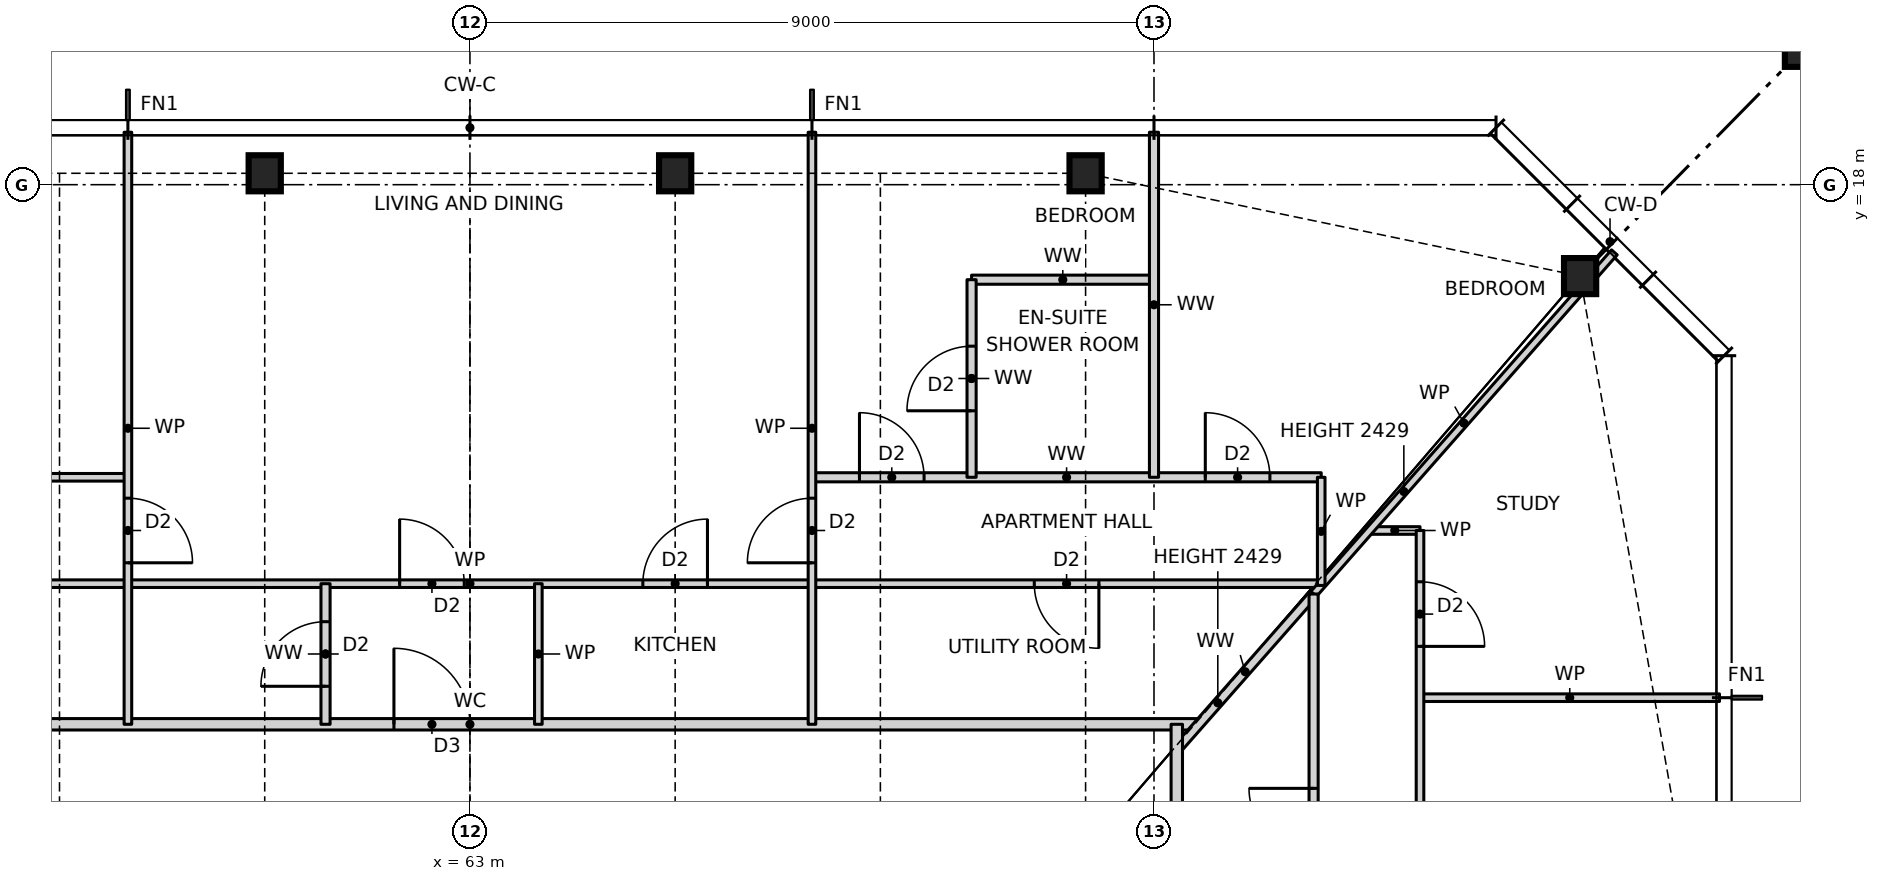
"""IFC4 building model, lengths in metres.
Left out: names, types, materials, properties, quantities, classifications, styles, units other than length and angle.
Written with IfcOpenShell. Run it as: python <this file> out.ifc"""

import sys

from ifc_helpers import new_model, si_unit, direction, frame, frame_2d, origin, origin_2d, place, context, subcontext, project, spatial, rectangle, hollow_rectangle, i_section, extrude, element, fill, save


model = new_model("IFC4")
c1 = context("Model", 3, precision=1e-05, world=origin(), true_north=direction((0.0, 1.0)))
c2 = subcontext(c1, "Body", "Model", "MODEL_VIEW")
j1 = project(units=[si_unit("LENGTHUNIT", "METRE"), si_unit("PLANEANGLEUNIT", "RADIAN")], contexts=[c1])
p1 = place(None, origin())
s1 = spatial("IfcSite", under=j1, at=p1, CompositionType="ELEMENT")
p2 = place(p1, origin())
s2 = spatial("IfcBuilding", under=s1, at=p2, CompositionType="ELEMENT")
p3 = place(p2, frame((0.0, 0.0, 39.5)))
s3 = spatial("IfcBuildingStorey", under=s2, at=p3, CompositionType="ELEMENT", Elevation=39.5)
for number, where, z_axis, x_axis in (
    (1, (77.606, 16.797, 0.0), (0.0, 0.0, 1.0), (1.0, 0.0, 0.0)),
    (2, (71.1, 18.15, 0.0), (0.0, 0.0, 1.0), (1.0, 0.0, 0.0)),
    (3, (65.7, 18.15, 0.0), (0.0, 0.0, 1.0), (1.0, 0.0, 0.0)),
    (4, (60.3, 18.15, 0.0), (0.0, 0.0, 1.0), (1.0, 0.0, 0.0)),
):
    element("IfcColumn", number, at=place(p3, frame(where, z_axis=z_axis, x_axis=x_axis)), inside=s3, PredefinedType="COLUMN", context=c2, shape_type="SweptSolid", body=[
        extrude(i_section(OverallWidth=0.424, OverallDepth=0.475, WebThickness=0.048, FlangeThickness=0.077, at=origin_2d()), origin(), (0.0, 0.0, 1.0), 3.5),
    ])
p4 = place(p3, frame((80.9, 20.15, 0.0), z_axis=(0.0, 0.0, 1.0), x_axis=(1.0, 0.0, 0.0)))
e5 = element("IfcColumn", 5, at=p4, inside=s3, PredefinedType="COLUMN", context=c2, shape_type="SweptSolid", body=[
    extrude(hollow_rectangle(XDim=1.2, YDim=1.2, WallThickness=0.07, at=origin_2d()), origin(), (0.0, 0.0, 1.0), 3.5),
])
p5 = place(p3, frame((53.408, 10.9, 0.0), z_axis=(0.0, 0.0, 1.0), x_axis=(1.0, 0.0, 0.0)))
e6 = element("IfcWall", 6, at=p5, inside=s3, PredefinedType="PARTITIONING", context=c2, shape_type="SweptSolid", body=[
    extrude(rectangle(XDim=19.184, YDim=0.15, at=frame_2d((9.592, 0.0))), origin(), (0.0, 0.0, 1.0), 3.27),
])
p6 = place(p5, frame((8.592, 0.0, 0.0)))
e7 = element("IfcOpeningElement", 7, at=p6, cuts=e6, PredefinedType="OPENING", context=c2, shape_type="SweptSolid", body=[
    extrude(rectangle(XDim=1.0, YDim=2.1, at=frame_2d((0.5, 1.05))), frame((0.0, 0.085, 0.0), z_axis=(0.0, -1.0, 0.0), x_axis=(1.0, 0.0, 0.0)), (0.0, 0.0, 1.0), 0.17),
])
p7 = place(p3, frame((75.5, 11.25, 0.0), z_axis=(0.0, 0.0, 1.0), x_axis=(1.0, 0.0, 0.0)))
e8 = element("IfcWall", 8, at=p7, inside=s3, PredefinedType="PARTITIONING", context=c2, shape_type="SweptSolid", body=[
    extrude(rectangle(XDim=3.94, YDim=0.1, at=frame_2d((1.97, 0.0))), origin(), (0.0, 0.0, 1.0), 3.27),
])
p8 = place(p3, frame((51.8, 12.75, 0.0), z_axis=(0.0, 0.0, 1.0), x_axis=(1.0, 0.0, 0.0)))
e9 = element("IfcWall", 9, at=p8, inside=s3, PredefinedType="PARTITIONING", context=c2, shape_type="SweptSolid", body=[
    extrude(rectangle(XDim=22.4, YDim=0.1, at=frame_2d((11.2, 0.0))), origin(), (0.0, 0.0, 1.0), 3.27),
])
p9 = place(p8, frame((13.475, 0.0, 0.0)))
e10 = element("IfcOpeningElement", 10, at=p9, cuts=e9, PredefinedType="OPENING", context=c2, shape_type="SweptSolid", body=[
    extrude(rectangle(XDim=0.85, YDim=2.1, at=frame_2d((0.425, 1.05))), frame((0.0, 0.06, 0.0), z_axis=(0.0, -1.0, 0.0), x_axis=(1.0, 0.0, 0.0)), (0.0, 0.0, 1.0), 0.12),
])
p10 = place(p8, frame((10.275, 0.0, 0.0)))
e11 = element("IfcOpeningElement", 11, at=p10, cuts=e9, PredefinedType="OPENING", context=c2, shape_type="SweptSolid", body=[
    extrude(rectangle(XDim=0.85, YDim=2.1, at=frame_2d((0.425, 1.05))), frame((0.0, 0.06, 0.0), z_axis=(0.0, -1.0, 0.0), x_axis=(1.0, 0.0, 0.0)), (0.0, 0.0, 1.0), 0.12),
])
p11 = place(p8, frame((18.625, 0.0, 0.0)))
e12 = element("IfcOpeningElement", 12, at=p11, cuts=e9, PredefinedType="OPENING", context=c2, shape_type="SweptSolid", body=[
    extrude(rectangle(XDim=0.85, YDim=2.1, at=frame_2d((0.425, 1.05))), frame((0.0, 0.06, 0.0), z_axis=(0.0, -1.0, 0.0), x_axis=(1.0, 0.0, 0.0)), (0.0, 0.0, 1.0), 0.12),
])
p12 = place(p8, frame((2.925, 0.0, 0.0)))
e13 = element("IfcOpeningElement", 13, at=p12, cuts=e9, PredefinedType="OPENING", context=c2, shape_type="SweptSolid", body=[
    extrude(rectangle(XDim=0.85, YDim=2.1, at=frame_2d((0.425, 1.05))), frame((0.0, 0.06, 0.0), z_axis=(0.0, -1.0, 0.0), x_axis=(1.0, 0.0, 0.0)), (0.0, 0.0, 1.0), 0.12),
])
p13 = place(p3, frame((74.836, 13.45, 0.0), z_axis=(0.0, 0.0, 1.0), x_axis=(1.0, 0.0, 0.0)))
e14 = element("IfcWall", 14, at=p13, inside=s3, PredefinedType="PARTITIONING", context=c2, shape_type="SweptSolid", body=[
    extrude(rectangle(XDim=0.664, YDim=0.1, at=frame_2d((0.332, 0.0))), origin(), (0.0, 0.0, 1.0), 3.27),
])
p14 = place(p3, frame((51.8, 14.15, 0.0), z_axis=(0.0, 0.0, 1.0), x_axis=(1.0, 0.0, 0.0)))
e15 = element("IfcWall", 15, at=p14, inside=s3, PredefinedType="PARTITIONING", context=c2, shape_type="SweptSolid", body=[
    extrude(rectangle(XDim=6.7, YDim=0.1, at=frame_2d((3.35, 0.0))), origin(), (0.0, 0.0, 1.0), 3.27),
])
p15 = place(p14, frame((4.025, 0.0, 0.0)))
e16 = element("IfcOpeningElement", 16, at=p15, cuts=e15, PredefinedType="OPENING", context=c2, shape_type="SweptSolid", body=[
    extrude(rectangle(XDim=0.85, YDim=2.1, at=frame_2d((0.425, 1.05))), frame((0.0, 0.06, 0.0), z_axis=(0.0, -1.0, 0.0), x_axis=(1.0, 0.0, 0.0)), (0.0, 0.0, 1.0), 0.12),
])
p16 = place(p14, frame((0.675, 0.0, 0.0)))
e17 = element("IfcOpeningElement", 17, at=p16, cuts=e15, PredefinedType="OPENING", context=c2, shape_type="SweptSolid", body=[
    extrude(rectangle(XDim=0.85, YDim=2.1, at=frame_2d((0.425, 1.05))), frame((0.0, 0.06, 0.0), z_axis=(0.0, -1.0, 0.0), x_axis=(1.0, 0.0, 0.0)), (0.0, 0.0, 1.0), 0.12),
])
p17 = place(p3, frame((67.5, 14.15, 0.0), z_axis=(0.0, 0.0, 1.0), x_axis=(1.0, 0.0, 0.0)))
e18 = element("IfcWall", 18, at=p17, inside=s3, PredefinedType="PARTITIONING", context=c2, shape_type="SweptSolid", body=[
    extrude(rectangle(XDim=6.7, YDim=0.12, at=frame_2d((3.35, 0.0))), origin(), (0.0, 0.0, 1.0), 3.27),
])
p18 = place(p17, frame((0.625, 0.0, 0.0)))
e19 = element("IfcOpeningElement", 19, at=p18, cuts=e18, PredefinedType="OPENING", context=c2, shape_type="SweptSolid", body=[
    extrude(rectangle(XDim=0.85, YDim=2.1, at=frame_2d((0.425, 1.05))), frame((0.0, 0.07, 0.0), z_axis=(0.0, -1.0, 0.0), x_axis=(1.0, 0.0, 0.0)), (0.0, 0.0, 1.0), 0.14),
])
p19 = place(p17, frame((5.175, 0.0, 0.0)))
e20 = element("IfcOpeningElement", 20, at=p19, cuts=e18, PredefinedType="OPENING", context=c2, shape_type="SweptSolid", body=[
    extrude(rectangle(XDim=0.85, YDim=2.1, at=frame_2d((0.425, 1.05))), frame((0.0, 0.07, 0.0), z_axis=(0.0, -1.0, 0.0), x_axis=(1.0, 0.0, 0.0)), (0.0, 0.0, 1.0), 0.14),
])
p20 = place(p3, frame((69.6, 16.75, 0.0), z_axis=(0.0, 0.0, 1.0), x_axis=(1.0, 0.0, 0.0)))
e21 = element("IfcWall", 21, at=p20, inside=s3, PredefinedType="PARTITIONING", context=c2, shape_type="SweptSolid", body=[
    extrude(rectangle(XDim=2.4, YDim=0.12, at=frame_2d((1.2, 0.0))), origin(), (0.0, 0.0, 1.0), 3.27),
])
p21 = place(p3, frame((74.1, 12.614, 0.0), z_axis=(0.0, 0.0, 1.0), x_axis=(0.660755619739, 0.750601099775, 0.0)))
e22 = element("IfcWall", 22, at=p21, inside=s3, PredefinedType="PARTITIONING", context=c2, shape_type="SweptSolid", body=[
    extrude(rectangle(XDim=5.989, YDim=0.1, at=frame_2d((2.995, 0.0))), origin(), (0.0, 0.0, 1.0), 2.429),
])
p22 = place(p3, frame((72.299, 10.569, 0.0), z_axis=(0.0, 0.0, 1.0), x_axis=(0.660797520752, 0.750564212155, 0.0)))
e23 = element("IfcWall", 23, at=p22, inside=s3, PredefinedType="PARTITIONING", context=c2, shape_type="SweptSolid", body=[
    extrude(rectangle(XDim=2.725, YDim=0.12, at=frame_2d((1.363, 0.0))), origin(), (0.0, 0.0, 1.0), 2.429),
])
p23 = place(p3, frame((75.5, 2.25, 0.0), z_axis=(0.0, 0.0, 1.0), x_axis=(0.0, 1.0, 0.0)))
e24 = element("IfcWall", 24, at=p23, inside=s3, PredefinedType="PARTITIONING", context=c2, shape_type="SweptSolid", body=[
    extrude(rectangle(XDim=11.2, YDim=0.1, at=frame_2d((5.6, 0.0))), origin(), (0.0, 0.0, 1.0), 3.27),
])
p24 = place(p23, frame((1.825, 0.0, 0.0)))
e25 = element("IfcOpeningElement", 25, at=p24, cuts=e24, PredefinedType="OPENING", context=c2, shape_type="SweptSolid", body=[
    extrude(rectangle(XDim=0.85, YDim=2.1, at=frame_2d((0.425, 1.05))), frame((0.0, 0.06, 0.0), z_axis=(0.0, -1.0, 0.0), x_axis=(1.0, 0.0, 0.0)), (0.0, 0.0, 1.0), 0.12),
])
p25 = place(p23, frame((6.325, 0.0, 0.0)))
e26 = element("IfcOpeningElement", 26, at=p25, cuts=e24, PredefinedType="OPENING", context=c2, shape_type="SweptSolid", body=[
    extrude(rectangle(XDim=0.85, YDim=2.1, at=frame_2d((0.425, 1.05))), frame((0.0, 0.06, 0.0), z_axis=(0.0, -1.0, 0.0), x_axis=(1.0, 0.0, 0.0)), (0.0, 0.0, 1.0), 0.12),
])
p26 = place(p23, frame((9.675, 0.0, 0.0)))
e27 = element("IfcOpeningElement", 27, at=p26, cuts=e24, PredefinedType="OPENING", context=c2, shape_type="SweptSolid", body=[
    extrude(rectangle(XDim=0.85, YDim=2.1, at=frame_2d((0.425, 1.05))), frame((0.0, 0.06, 0.0), z_axis=(0.0, -1.0, 0.0), x_axis=(1.0, 0.0, 0.0)), (0.0, 0.0, 1.0), 0.12),
])
p27 = place(p3, frame((74.2, 12.727, 0.0), z_axis=(0.0, 0.0, 1.0), x_axis=(0.0, 1.0, 0.0)))
e28 = element("IfcWall", 28, at=p27, inside=s3, PredefinedType="PARTITIONING", context=c2, shape_type="SweptSolid", body=[
    extrude(rectangle(XDim=1.423, YDim=0.1, at=frame_2d((0.711, 0.0))), origin(), (0.0, 0.0, 1.0), 3.27),
])
p28 = place(p3, frame((74.1, -12.614, 0.0), z_axis=(0.0, 0.0, 1.0), x_axis=(0.0, 1.0, 0.0)))
e29 = element("IfcWall", 29, at=p28, inside=s3, PredefinedType="PARTITIONING", context=c2, shape_type="SweptSolid", body=[
    extrude(rectangle(XDim=25.228, YDim=0.12, at=frame_2d((12.614, 0.0))), origin(), (0.0, 0.0, 1.0), 3.27),
])
p29 = place(p28, frame((7.239, 0.0, 0.0)))
e30 = element("IfcOpeningElement", 30, at=p29, cuts=e29, PredefinedType="OPENING", context=c2, shape_type="SweptSolid", body=[
    extrude(rectangle(XDim=0.85, YDim=2.1, at=frame_2d((0.425, 1.05))), frame((0.0, 0.07, 0.0), z_axis=(0.0, -1.0, 0.0), x_axis=(1.0, 0.0, 0.0)), (0.0, 0.0, 1.0), 0.14),
])
p30 = place(p28, frame((10.439, 0.0, 0.0)))
e31 = element("IfcOpeningElement", 31, at=p30, cuts=e29, PredefinedType="OPENING", context=c2, shape_type="SweptSolid", body=[
    extrude(rectangle(XDim=0.85, YDim=2.1, at=frame_2d((0.425, 1.05))), frame((0.0, 0.07, 0.0), z_axis=(0.0, -1.0, 0.0), x_axis=(1.0, 0.0, 0.0)), (0.0, 0.0, 1.0), 0.14),
])
p31 = place(p28, frame((2.507, 0.0, 0.0)))
e32 = element("IfcOpeningElement", 32, at=p31, cuts=e29, PredefinedType="OPENING", context=c2, shape_type="SweptSolid", body=[
    extrude(rectangle(XDim=0.85, YDim=2.1, at=frame_2d((0.425, 1.05))), frame((0.0, 0.07, 0.0), z_axis=(0.0, -1.0, 0.0), x_axis=(1.0, 0.0, 0.0)), (0.0, 0.0, 1.0), 0.14),
])
p32 = place(p28, frame((16.639, 0.0, 0.0)))
e33 = element("IfcOpeningElement", 33, at=p32, cuts=e29, PredefinedType="OPENING", context=c2, shape_type="SweptSolid", body=[
    extrude(rectangle(XDim=0.85, YDim=2.1, at=frame_2d((0.425, 1.05))), frame((0.0, 0.07, 0.0), z_axis=(0.0, -1.0, 0.0), x_axis=(1.0, 0.0, 0.0)), (0.0, 0.0, 1.0), 0.14),
])
p33 = place(p28, frame((21.821, 0.0, 0.0)))
e34 = element("IfcOpeningElement", 34, at=p33, cuts=e29, PredefinedType="OPENING", context=c2, shape_type="SweptSolid", body=[
    extrude(rectangle(XDim=0.85, YDim=2.1, at=frame_2d((0.425, 1.05))), frame((0.0, 0.07, 0.0), z_axis=(0.0, -1.0, 0.0), x_axis=(1.0, 0.0, 0.0)), (0.0, 0.0, 1.0), 0.14),
])
p34 = place(p3, frame((72.3, -10.568, 0.0), z_axis=(0.0, 0.0, 1.0), x_axis=(0.0, 1.0, 0.0)))
e35 = element("IfcWall", 35, at=p34, inside=s3, PredefinedType="PARTITIONING", context=c2, shape_type="SweptSolid", body=[
    extrude(rectangle(XDim=21.468, YDim=0.15, at=frame_2d((10.734, 0.0))), origin(), (0.0, 0.0, 1.0), 3.27),
])
p35 = place(p34, frame((8.318, 0.0, 0.0)))
e36 = element("IfcOpeningElement", 36, at=p35, cuts=e35, PredefinedType="OPENING", context=c2, shape_type="SweptSolid", body=[
    extrude(rectangle(XDim=1.0, YDim=2.1, at=frame_2d((0.5, 1.05))), frame((0.0, 0.085, 0.0), z_axis=(0.0, -1.0, 0.0), x_axis=(1.0, 0.0, 0.0)), (0.0, 0.0, 1.0), 0.17),
])
p36 = place(p3, frame((72.0, 14.15, 0.0), z_axis=(0.0, 0.0, 1.0), x_axis=(0.0, 1.0, 0.0)))
e37 = element("IfcWall", 37, at=p36, inside=s3, PredefinedType="PARTITIONING", context=c2, shape_type="SweptSolid", body=[
    extrude(rectangle(XDim=4.54, YDim=0.12, at=frame_2d((2.27, 0.0))), origin(), (0.0, 0.0, 1.0), 3.27),
])
p37 = place(p3, frame((69.6, 14.15, 0.0), z_axis=(0.0, 0.0, 1.0), x_axis=(0.0, 1.0, 0.0)))
e38 = element("IfcWall", 38, at=p37, inside=s3, PredefinedType="PARTITIONING", context=c2, shape_type="SweptSolid", body=[
    extrude(rectangle(XDim=2.6, YDim=0.12, at=frame_2d((1.3, 0.0))), origin(), (0.0, 0.0, 1.0), 3.27),
])
p38 = place(p37, frame((0.875, 0.0, 0.0)))
e39 = element("IfcOpeningElement", 39, at=p38, cuts=e38, PredefinedType="OPENING", context=c2, shape_type="SweptSolid", body=[
    extrude(rectangle(XDim=0.85, YDim=2.1, at=frame_2d((0.425, 1.05))), frame((0.0, 0.07, 0.0), z_axis=(0.0, -1.0, 0.0), x_axis=(1.0, 0.0, 0.0)), (0.0, 0.0, 1.0), 0.14),
])
p39 = place(p3, frame((67.5, 10.9, 0.0), z_axis=(0.0, 0.0, 1.0), x_axis=(0.0, 1.0, 0.0)))
e40 = element("IfcWall", 40, at=p39, inside=s3, PredefinedType="PARTITIONING", context=c2, shape_type="SweptSolid", body=[
    extrude(rectangle(XDim=7.79, YDim=0.1, at=frame_2d((3.895, 0.0))), origin(), (0.0, 0.0, 1.0), 3.27),
])
p40 = place(p39, frame((2.125, 0.0, 0.0)))
e41 = element("IfcOpeningElement", 41, at=p40, cuts=e40, PredefinedType="OPENING", context=c2, shape_type="SweptSolid", body=[
    extrude(rectangle(XDim=0.85, YDim=2.1, at=frame_2d((0.425, 1.05))), frame((0.0, 0.06, 0.0), z_axis=(0.0, -1.0, 0.0), x_axis=(1.0, 0.0, 0.0)), (0.0, 0.0, 1.0), 0.12),
])
p41 = place(p3, frame((63.9, 10.9, 0.0), z_axis=(0.0, 0.0, 1.0), x_axis=(0.0, 1.0, 0.0)))
e42 = element("IfcWall", 42, at=p41, inside=s3, PredefinedType="PARTITIONING", context=c2, shape_type="SweptSolid", body=[
    extrude(rectangle(XDim=1.85, YDim=0.1, at=frame_2d((0.925, 0.0))), origin(), (0.0, 0.0, 1.0), 3.27),
])
p42 = place(p3, frame((61.1, 10.9, 0.0), z_axis=(0.0, 0.0, 1.0), x_axis=(0.0, 1.0, 0.0)))
e43 = element("IfcWall", 43, at=p42, inside=s3, PredefinedType="PARTITIONING", context=c2, shape_type="SweptSolid", body=[
    extrude(rectangle(XDim=1.85, YDim=0.12, at=frame_2d((0.925, 0.0))), origin(), (0.0, 0.0, 1.0), 3.27),
])
p43 = place(p42, frame((0.5, 0.0, 0.0)))
e44 = element("IfcOpeningElement", 44, at=p43, cuts=e43, PredefinedType="OPENING", context=c2, shape_type="SweptSolid", body=[
    extrude(rectangle(XDim=0.85, YDim=2.1, at=frame_2d((0.425, 1.05))), frame((0.0, 0.07, 0.0), z_axis=(0.0, -1.0, 0.0), x_axis=(1.0, 0.0, 0.0)), (0.0, 0.0, 1.0), 0.14),
])
p44 = place(p3, frame((58.5, 10.9, 0.0), z_axis=(0.0, 0.0, 1.0), x_axis=(0.0, 1.0, 0.0)))
e45 = element("IfcWall", 45, at=p44, inside=s3, PredefinedType="PARTITIONING", context=c2, shape_type="SweptSolid", body=[
    extrude(rectangle(XDim=7.79, YDim=0.1, at=frame_2d((3.895, 0.0))), origin(), (0.0, 0.0, 1.0), 3.27),
])
p45 = place(p44, frame((2.125, 0.0, 0.0)))
e46 = element("IfcOpeningElement", 46, at=p45, cuts=e45, PredefinedType="OPENING", context=c2, shape_type="SweptSolid", body=[
    extrude(rectangle(XDim=0.85, YDim=2.1, at=frame_2d((0.425, 1.05))), frame((0.0, 0.06, 0.0), z_axis=(0.0, -1.0, 0.0), x_axis=(1.0, 0.0, 0.0)), (0.0, 0.0, 1.0), 0.12),
])
p46 = place(p26, frame((0.85, 0.0, 0.0), z_axis=(0.0, 0.0, 1.0), x_axis=(-1.0, 0.0, 0.0)))
e47 = element("IfcDoor", 47, at=p46, inside=s3, OperationType="SINGLE_SWING_RIGHT", PredefinedType="DOOR", context=c2, shape_type="SweptSolid", body=[
    extrude(rectangle(XDim=0.85, YDim=2.1, at=frame_2d((0.425, 1.05))), frame((0.0, 0.025, 0.0), z_axis=(0.0, -1.0, 0.0), x_axis=(1.0, 0.0, 0.0)), (0.0, 0.0, 1.0), 0.05),
])
fill(e27, e47)
p47 = place(p33, origin())
e48 = element("IfcDoor", 48, at=p47, inside=s3, OperationType="SINGLE_SWING_RIGHT", PredefinedType="DOOR", context=c2, shape_type="SweptSolid", body=[
    extrude(rectangle(XDim=0.85, YDim=2.1, at=frame_2d((0.425, 1.05))), frame((0.0, 0.025, 0.0), z_axis=(0.0, -1.0, 0.0), x_axis=(1.0, 0.0, 0.0)), (0.0, 0.0, 1.0), 0.05),
])
fill(e34, e48)
p48 = place(p9, origin())
e49 = element("IfcDoor", 49, at=p48, inside=s3, OperationType="SINGLE_SWING_RIGHT", PredefinedType="DOOR", context=c2, shape_type="SweptSolid", body=[
    extrude(rectangle(XDim=0.85, YDim=2.1, at=frame_2d((0.425, 1.05))), frame((0.0, 0.025, 0.0), z_axis=(0.0, -1.0, 0.0), x_axis=(1.0, 0.0, 0.0)), (0.0, 0.0, 1.0), 0.05),
])
fill(e10, e49)
p49 = place(p6, origin())
e50 = element("IfcDoor", 50, at=p49, inside=s3, OperationType="SINGLE_SWING_LEFT", PredefinedType="DOOR", context=c2, shape_type="SweptSolid", body=[
    extrude(rectangle(XDim=1.0, YDim=2.1, at=frame_2d((0.5, 1.05))), frame((0.0, 0.025, 0.0), z_axis=(0.0, -1.0, 0.0), x_axis=(1.0, 0.0, 0.0)), (0.0, 0.0, 1.0), 0.05),
])
fill(e7, e50)
p50 = place(p10, origin())
e51 = element("IfcDoor", 51, at=p50, inside=s3, OperationType="SINGLE_SWING_LEFT", PredefinedType="DOOR", context=c2, shape_type="SweptSolid", body=[
    extrude(rectangle(XDim=0.85, YDim=2.1, at=frame_2d((0.425, 1.05))), frame((0.0, 0.025, 0.0), z_axis=(0.0, -1.0, 0.0), x_axis=(1.0, 0.0, 0.0)), (0.0, 0.0, 1.0), 0.05),
])
fill(e11, e51)
p51 = place(p43, origin())
e52 = element("IfcDoor", 52, at=p51, inside=s3, OperationType="SINGLE_SWING_LEFT", PredefinedType="DOOR", context=c2, shape_type="SweptSolid", body=[
    extrude(rectangle(XDim=0.85, YDim=2.1, at=frame_2d((0.425, 1.05))), frame((0.0, 0.025, 0.0), z_axis=(0.0, -1.0, 0.0), x_axis=(1.0, 0.0, 0.0)), (0.0, 0.0, 1.0), 0.05),
])
fill(e44, e52)
p52 = place(p40, origin())
e53 = element("IfcDoor", 53, at=p52, inside=s3, OperationType="SINGLE_SWING_LEFT", PredefinedType="DOOR", context=c2, shape_type="SweptSolid", body=[
    extrude(rectangle(XDim=0.85, YDim=2.1, at=frame_2d((0.425, 1.05))), frame((0.0, 0.025, 0.0), z_axis=(0.0, -1.0, 0.0), x_axis=(1.0, 0.0, 0.0)), (0.0, 0.0, 1.0), 0.05),
])
fill(e41, e53)
p53 = place(p38, origin())
e54 = element("IfcDoor", 54, at=p53, inside=s3, OperationType="SINGLE_SWING_LEFT", PredefinedType="DOOR", context=c2, shape_type="SweptSolid", body=[
    extrude(rectangle(XDim=0.85, YDim=2.1, at=frame_2d((0.425, 1.05))), frame((0.0, 0.025, 0.0), z_axis=(0.0, -1.0, 0.0), x_axis=(1.0, 0.0, 0.0)), (0.0, 0.0, 1.0), 0.05),
])
fill(e39, e54)
p54 = place(p18, origin())
e55 = element("IfcDoor", 55, at=p54, inside=s3, OperationType="SINGLE_SWING_LEFT", PredefinedType="DOOR", context=c2, shape_type="SweptSolid", body=[
    extrude(rectangle(XDim=0.85, YDim=2.1, at=frame_2d((0.425, 1.05))), frame((0.0, 0.025, 0.0), z_axis=(0.0, -1.0, 0.0), x_axis=(1.0, 0.0, 0.0)), (0.0, 0.0, 1.0), 0.05),
])
fill(e19, e55)
p55 = place(p19, origin())
e56 = element("IfcDoor", 56, at=p55, inside=s3, OperationType="SINGLE_SWING_LEFT", PredefinedType="DOOR", context=c2, shape_type="SweptSolid", body=[
    extrude(rectangle(XDim=0.85, YDim=2.1, at=frame_2d((0.425, 1.05))), frame((0.0, 0.025, 0.0), z_axis=(0.0, -1.0, 0.0), x_axis=(1.0, 0.0, 0.0)), (0.0, 0.0, 1.0), 0.05),
])
fill(e20, e56)
p56 = place(p11, frame((0.85, 0.0, 0.0), z_axis=(0.0, 0.0, 1.0), x_axis=(-1.0, 0.0, 0.0)))
e57 = element("IfcDoor", 57, at=p56, inside=s3, OperationType="SINGLE_SWING_LEFT", PredefinedType="DOOR", context=c2, shape_type="SweptSolid", body=[
    extrude(rectangle(XDim=0.85, YDim=2.1, at=frame_2d((0.425, 1.05))), frame((0.0, 0.025, 0.0), z_axis=(0.0, -1.0, 0.0), x_axis=(1.0, 0.0, 0.0)), (0.0, 0.0, 1.0), 0.05),
])
fill(e12, e57)
p57 = place(p45, frame((0.85, 0.0, 0.0), z_axis=(0.0, 0.0, 1.0), x_axis=(-1.0, 0.0, 0.0)))
e58 = element("IfcDoor", 58, at=p57, inside=s3, OperationType="SINGLE_SWING_RIGHT", PredefinedType="DOOR", context=c2, shape_type="SweptSolid", body=[
    extrude(rectangle(XDim=0.85, YDim=2.1, at=frame_2d((0.425, 1.05))), frame((0.0, 0.025, 0.0), z_axis=(0.0, -1.0, 0.0), x_axis=(1.0, 0.0, 0.0)), (0.0, 0.0, 1.0), 0.05),
])
fill(e46, e58)
save(model, sys.argv[1])
